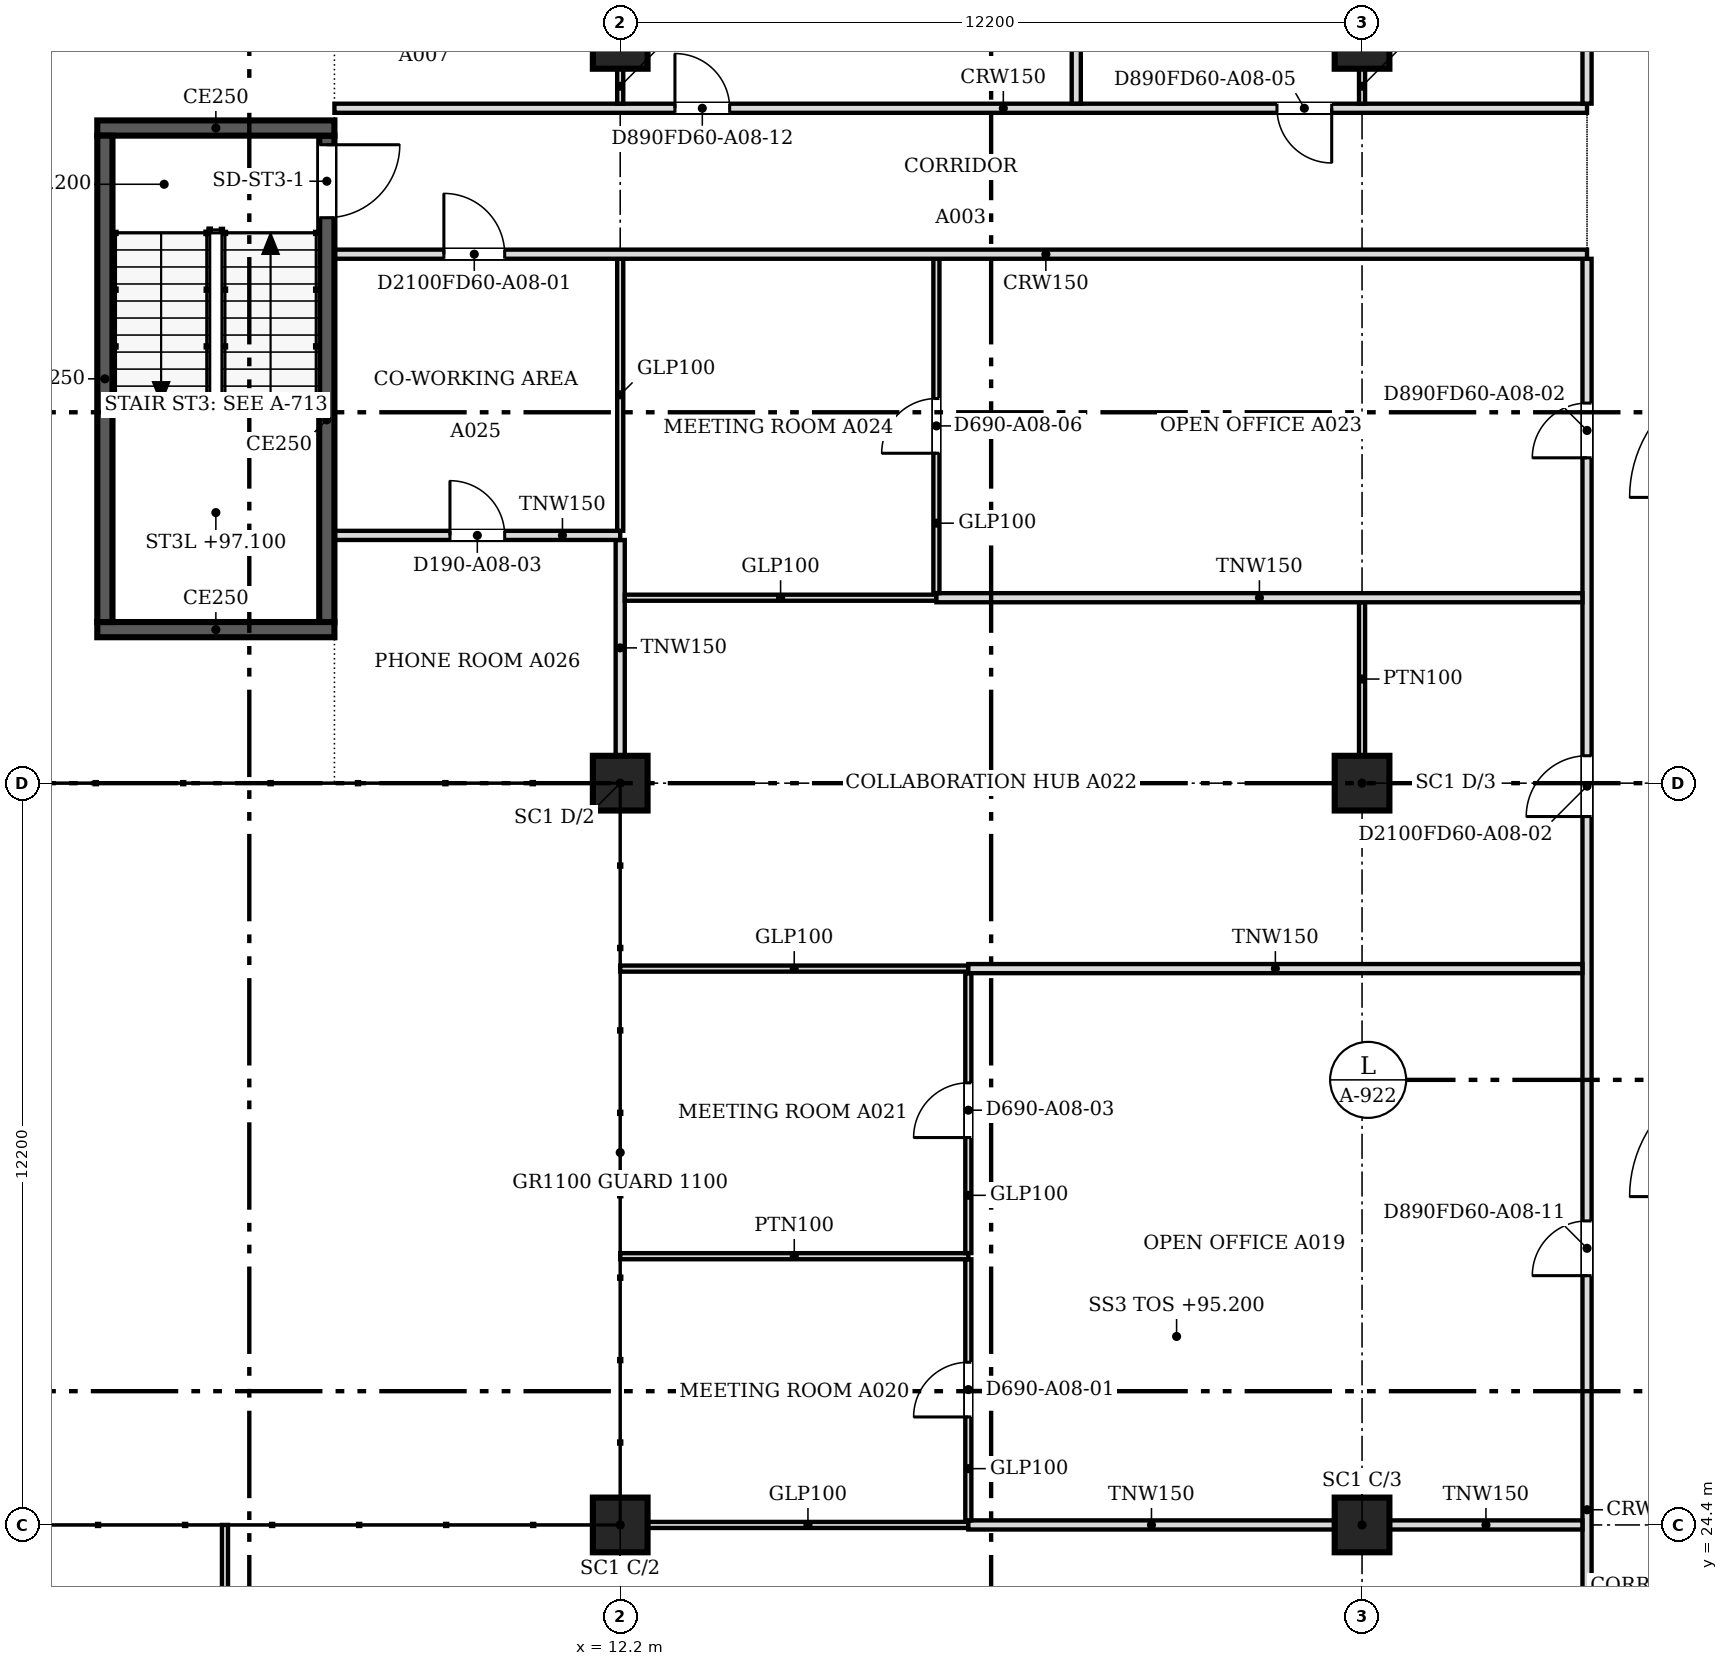
"""IFC4 building model, lengths in metres.
Left out: names, types, materials, properties, quantities, classifications, styles, units other than length and angle.
Written with IfcOpenShell. Run it as: python <this file> out.ifc"""

import sys

from ifc_helpers import new_model, si_unit, direction, frame, frame_2d, origin, origin_2d, place, context, subcontext, project, spatial, rectangle, extrude, source, transform, mapped, element, fill, save


model = new_model("IFC4")
c1 = context("Model", 3, precision=1e-05, world=origin(), true_north=direction((0.0, 1.0)))
c2 = subcontext(c1, "Body", "Model", "MODEL_VIEW")
j1 = project(units=[si_unit("LENGTHUNIT", "METRE"), si_unit("PLANEANGLEUNIT", "RADIAN")], contexts=[c1])
p1 = place(None, origin())
s1 = spatial("IfcSite", under=j1, at=p1, CompositionType="ELEMENT")
p2 = place(p1, origin())
s2 = spatial("IfcBuilding", under=s1, at=p2, CompositionType="ELEMENT")
p3 = place(p2, frame((0.0, 0.0, 95.2)))
s3 = spatial("IfcBuildingStorey", under=s2, at=p3, CompositionType="ELEMENT", Elevation=95.2)
for number, where, z_axis, x_axis in (
    (1, (12.2, 24.4, 0.0), (0.0, 0.0, 1.0), (1.0, 0.0, 0.0)),
    (2, (12.2, 36.6, 0.0), (0.0, 0.0, 1.0), (1.0, 0.0, 0.0)),
    (3, (12.2, 48.8, 0.0), (0.0, 0.0, 1.0), (1.0, 0.0, 0.0)),
    (4, (24.4, 24.4, 0.0), (0.0, 0.0, 1.0), (1.0, 0.0, 0.0)),
    (5, (24.4, 36.6, 0.0), (0.0, 0.0, 1.0), (1.0, 0.0, 0.0)),
    (6, (24.4, 48.8, 0.0), (0.0, 0.0, 1.0), (1.0, 0.0, 0.0)),
):
    element("IfcColumn", number, at=place(p3, frame(where, z_axis=z_axis, x_axis=x_axis)), inside=s3, PredefinedType="COLUMN", context=c2, shape_type="SweptSolid", body=[
        extrude(rectangle(XDim=0.9, YDim=0.9, at=origin_2d()), origin(), (0.0, 0.0, 1.0), 3.6),
    ])
p4 = place(p3, frame((7.5, 39.125, 0.0), z_axis=(0.0, 0.0, 1.0), x_axis=(-1.0, 0.0, 0.0)))
e7 = element("IfcWall", 7, at=p4, inside=s3, PredefinedType="SOLIDWALL", context=c2, shape_type="SweptSolid", body=[
    extrude(rectangle(XDim=3.9, YDim=0.25, at=frame_2d((1.95, 0.0))), origin(), (0.0, 0.0, 1.0), 3.8),
])
p5 = place(p3, frame((3.725, 39.25, 0.0), z_axis=(0.0, 0.0, 1.0), x_axis=(0.0, 1.0, 0.0)))
e8 = element("IfcWall", 8, at=p5, inside=s3, PredefinedType="SOLIDWALL", context=c2, shape_type="SweptSolid", body=[
    extrude(rectangle(XDim=8.0, YDim=0.25, at=frame_2d((4.0, 0.0))), origin(), (0.0, 0.0, 1.0), 3.8),
])
p6 = place(p3, frame((3.6, 47.375, 0.0), z_axis=(0.0, 0.0, 1.0), x_axis=(1.0, 0.0, 0.0)))
e9 = element("IfcWall", 9, at=p6, inside=s3, PredefinedType="SOLIDWALL", context=c2, shape_type="SweptSolid", body=[
    extrude(rectangle(XDim=3.9, YDim=0.25, at=frame_2d((1.95, 0.0))), origin(), (0.0, 0.0, 1.0), 3.8),
])
p7 = place(p3, frame((7.375, 47.25, 0.0), z_axis=(0.0, 0.0, 1.0), x_axis=(0.0, -1.0, 0.0)))
e10 = element("IfcWall", 10, at=p7, inside=s3, PredefinedType="SOLIDWALL", context=c2, shape_type="SweptSolid", body=[
    extrude(rectangle(XDim=8.0, YDim=0.25, at=frame_2d((4.0, 0.0))), origin(), (0.0, 0.0, 1.0), 3.8),
])
m1 = source(origin(), c2, "Body", "SweptSolid", [
    extrude(rectangle(XDim=1.2, YDim=2.1, at=frame_2d((0.6, 1.05))), frame((0.0, 0.135, 0.0), z_axis=(0.0, -1.0, 0.0), x_axis=(1.0, 0.0, 0.0)), (0.0, 0.0, 1.0), 0.27),
])
p8 = place(p7, frame((0.15, 0.0, 0.0)))
e11 = element("IfcOpeningElement", 11, at=p8, cuts=e10, PredefinedType="OPENING", context=c2, shape_type="MappedRepresentation", body=[
    mapped(m1, transform((0.0, 0.0, 0.0), scale=1.0)),
])
p9 = place(p3, frame((28.1, 18.8, 0.0), z_axis=(0.0, 0.0, 1.0), x_axis=(0.0, 1.0, 0.0)))
e12 = element("IfcWall", 12, at=p9, inside=s3, PredefinedType="PARTITIONING", context=c2, shape_type="SweptSolid", body=[
    extrude(rectangle(XDim=26.424, YDim=0.15, at=frame_2d((13.212, 0.0))), origin(), (0.0, 0.0, 1.0), 3.067),
])
m2 = source(origin(), c2, "Body", "SweptSolid", [
    extrude(rectangle(XDim=0.9, YDim=2.1, at=frame_2d((0.45, 1.05))), frame((0.0, 0.085, 0.0), z_axis=(0.0, -1.0, 0.0), x_axis=(1.0, 0.0, 0.0)), (0.0, 0.0, 1.0), 0.17),
])
p10 = place(p9, frame((1.1, 0.0, 0.0)))
e13 = element("IfcOpeningElement", 13, at=p10, cuts=e12, PredefinedType="OPENING", context=c2, shape_type="MappedRepresentation", body=[
    mapped(m2, transform((0.0, 0.0, 0.0), scale=1.0)),
])
p11 = place(p9, frame((23.151, 0.0, 0.0)))
e14 = element("IfcOpeningElement", 14, at=p11, cuts=e12, PredefinedType="OPENING", context=c2, shape_type="MappedRepresentation", body=[
    mapped(m2, transform((0.0, 0.0, 0.0), scale=1.0)),
])
m3 = source(origin(), c2, "Body", "SweptSolid", [
    extrude(rectangle(XDim=1.0, YDim=2.1, at=frame_2d((0.5, 1.05))), frame((0.0, 0.085, 0.0), z_axis=(0.0, -1.0, 0.0), x_axis=(1.0, 0.0, 0.0)), (0.0, 0.0, 1.0), 0.17),
])
p12 = place(p9, frame((17.251, 0.0, 0.0)))
e15 = element("IfcOpeningElement", 15, at=p12, cuts=e12, PredefinedType="OPENING", context=c2, shape_type="MappedRepresentation", body=[
    mapped(m3, transform((0.0, 0.0, 0.0), scale=1.0)),
])
p13 = place(p9, frame((9.7, 0.0, 0.0)))
e16 = element("IfcOpeningElement", 16, at=p13, cuts=e12, PredefinedType="OPENING", context=c2, shape_type="MappedRepresentation", body=[
    mapped(m2, transform((0.0, 0.0, 0.0), scale=1.0)),
])
p14 = place(p3, frame((5.7, 18.99, 0.0), z_axis=(0.0, 0.0, 1.0), x_axis=(0.0, 1.0, 0.0)))
e17 = element("IfcWall", 17, at=p14, inside=s3, PredefinedType="PARTITIONING", context=c2, shape_type="SweptSolid", body=[
    extrude(rectangle(XDim=5.41, YDim=0.1, at=frame_2d((2.705, 0.0))), origin(), (0.0, 0.0, 1.0), 3.067),
])
m4 = source(origin(), c2, "Body", "SweptSolid", [
    extrude(rectangle(XDim=0.9, YDim=2.1, at=frame_2d((0.45, 1.05))), frame((0.0, 0.06, 0.0), z_axis=(0.0, -1.0, 0.0), x_axis=(1.0, 0.0, 0.0)), (0.0, 0.0, 1.0), 0.12),
])
p15 = place(p14, frame((2.3, 0.0, 0.0)))
e18 = element("IfcOpeningElement", 18, at=p15, cuts=e17, PredefinedType="OPENING", context=c2, shape_type="MappedRepresentation", body=[
    mapped(m4, transform((0.0, 0.0, 0.0), scale=1.0)),
])
p16 = place(p3, frame((12.651, 24.4, 0.0), z_axis=(0.0, 0.0, 1.0), x_axis=(1.0, 0.0, 0.0)))
e19 = element("IfcWall", 19, at=p16, inside=s3, PredefinedType="PARTITIONING", context=c2, shape_type="SweptSolid", body=[
    extrude(rectangle(XDim=5.273, YDim=0.1, at=frame_2d((2.637, 0.0))), origin(), (0.0, 0.0, 1.0), 3.067),
])
p17 = place(p3, frame((17.925, 24.4, 0.0), z_axis=(0.0, 0.0, 1.0), x_axis=(1.0, 0.0, 0.0)))
e20 = element("IfcWall", 20, at=p17, inside=s3, PredefinedType="PARTITIONING", context=c2, shape_type="SweptSolid", body=[
    extrude(rectangle(XDim=6.024, YDim=0.15, at=frame_2d((3.012, 0.0))), origin(), (0.0, 0.0, 1.0), 3.067),
])
p18 = place(p3, frame((24.851, 24.4, 0.0), z_axis=(0.0, 0.0, 1.0), x_axis=(1.0, 0.0, 0.0)))
e21 = element("IfcWall", 21, at=p18, inside=s3, PredefinedType="PARTITIONING", context=c2, shape_type="SweptSolid", body=[
    extrude(rectangle(XDim=3.173, YDim=0.15, at=frame_2d((1.586, 0.0))), origin(), (0.0, 0.0, 1.0), 3.067),
])
p19 = place(p3, frame((17.925, 24.476, 0.0), z_axis=(0.0, 0.0, 1.0), x_axis=(0.0, 1.0, 0.0)))
e22 = element("IfcWall", 22, at=p19, inside=s3, PredefinedType="PARTITIONING", context=c2, shape_type="SweptSolid", body=[
    extrude(rectangle(XDim=4.293, YDim=0.1, at=frame_2d((2.146, 0.0))), origin(), (0.0, 0.0, 1.0), 3.067),
])
p20 = place(p19, frame((1.7, 0.0, 0.0)))
e23 = element("IfcOpeningElement", 23, at=p20, cuts=e22, PredefinedType="OPENING", context=c2, shape_type="MappedRepresentation", body=[
    mapped(m4, transform((0.0, 0.0, 0.0), scale=1.0)),
])
p21 = place(p3, frame((12.2, 28.82, 0.0), z_axis=(0.0, 0.0, 1.0), x_axis=(1.0, 0.0, 0.0)))
e24 = element("IfcWall", 24, at=p21, inside=s3, PredefinedType="PARTITIONING", context=c2, shape_type="SweptSolid", body=[
    extrude(rectangle(XDim=5.725, YDim=0.1, at=frame_2d((2.863, 0.0))), origin(), (0.0, 0.0, 1.0), 3.067),
])
p22 = place(p3, frame((17.925, 28.871, 0.0), z_axis=(0.0, 0.0, 1.0), x_axis=(0.0, 1.0, 0.0)))
e25 = element("IfcWall", 25, at=p22, inside=s3, PredefinedType="PARTITIONING", context=c2, shape_type="SweptSolid", body=[
    extrude(rectangle(XDim=4.603, YDim=0.1, at=frame_2d((2.301, 0.0))), origin(), (0.0, 0.0, 1.0), 3.067),
])
p23 = place(p22, frame((1.9, 0.0, 0.0)))
e26 = element("IfcOpeningElement", 26, at=p23, cuts=e25, PredefinedType="OPENING", context=c2, shape_type="MappedRepresentation", body=[
    mapped(m4, transform((0.0, 0.0, 0.0), scale=1.0)),
])
p24 = place(p3, frame((12.2, 33.55, 0.0), z_axis=(0.0, 0.0, 1.0), x_axis=(1.0, 0.0, 0.0)))
e27 = element("IfcWall", 27, at=p24, inside=s3, PredefinedType="PARTITIONING", context=c2, shape_type="SweptSolid", body=[
    extrude(rectangle(XDim=5.724, YDim=0.1, at=frame_2d((2.862, 0.0))), origin(), (0.0, 0.0, 1.0), 3.067),
])
p25 = place(p3, frame((17.925, 33.55, 0.0), z_axis=(0.0, 0.0, 1.0), x_axis=(1.0, 0.0, 0.0)))
e28 = element("IfcWall", 28, at=p25, inside=s3, PredefinedType="PARTITIONING", context=c2, shape_type="SweptSolid", body=[
    extrude(rectangle(XDim=10.099, YDim=0.15, at=frame_2d((5.049, 0.0))), origin(), (0.0, 0.0, 1.0), 3.067),
])
p26 = place(p3, frame((12.2, 37.051, 0.0), z_axis=(0.0, 0.0, 1.0), x_axis=(0.0, 1.0, 0.0)))
e29 = element("IfcWall", 29, at=p26, inside=s3, PredefinedType="PARTITIONING", context=c2, shape_type="SweptSolid", body=[
    extrude(rectangle(XDim=3.548, YDim=0.15, at=frame_2d((1.774, 0.0))), origin(), (0.0, 0.0, 1.0), 3.067),
])
p27 = place(p3, frame((24.4, 37.05, 0.0), z_axis=(0.0, 0.0, 1.0), x_axis=(0.0, 1.0, 0.0)))
e30 = element("IfcWall", 30, at=p27, inside=s3, PredefinedType="PARTITIONING", context=c2, shape_type="SweptSolid", body=[
    extrude(rectangle(XDim=2.525, YDim=0.1, at=frame_2d((1.262, 0.0))), origin(), (0.0, 0.0, 1.0), 3.067),
])
p28 = place(p3, frame((12.276, 39.65, 0.0), z_axis=(0.0, 0.0, 1.0), x_axis=(1.0, 0.0, 0.0)))
e31 = element("IfcWall", 31, at=p28, inside=s3, PredefinedType="PARTITIONING", context=c2, shape_type="SweptSolid", body=[
    extrude(rectangle(XDim=5.123, YDim=0.1, at=frame_2d((2.562, 0.0))), origin(), (0.0, 0.0, 1.0), 3.067),
])
p29 = place(p3, frame((17.4, 39.65, 0.0), z_axis=(0.0, 0.0, 1.0), x_axis=(1.0, 0.0, 0.0)))
e32 = element("IfcWall", 32, at=p29, inside=s3, PredefinedType="PARTITIONING", context=c2, shape_type="SweptSolid", body=[
    extrude(rectangle(XDim=10.624, YDim=0.15, at=frame_2d((5.312, 0.0))), origin(), (0.0, 0.0, 1.0), 3.067),
])
p30 = place(p3, frame((17.4, 39.726, 0.0), z_axis=(0.0, 0.0, 1.0), x_axis=(0.0, 1.0, 0.0)))
e33 = element("IfcWall", 33, at=p30, inside=s3, PredefinedType="PARTITIONING", context=c2, shape_type="SweptSolid", body=[
    extrude(rectangle(XDim=5.498, YDim=0.1, at=frame_2d((2.749, 0.0))), origin(), (0.0, 0.0, 1.0), 3.067),
])
p31 = place(p30, frame((2.3, 0.0, 0.0)))
e34 = element("IfcOpeningElement", 34, at=p31, cuts=e33, PredefinedType="OPENING", context=c2, shape_type="MappedRepresentation", body=[
    mapped(m4, transform((0.0, 0.0, 0.0), scale=1.0)),
])
p32 = place(p3, frame((12.2, 40.675, 0.0), z_axis=(0.0, 0.0, 1.0), x_axis=(-1.0, 0.0, 0.0)))
e35 = element("IfcWall", 35, at=p32, inside=s3, PredefinedType="PARTITIONING", context=c2, shape_type="SweptSolid", body=[
    extrude(rectangle(XDim=4.7, YDim=0.15, at=frame_2d((2.35, 0.0))), origin(), (0.0, 0.0, 1.0), 3.067),
])
p33 = place(p32, frame((1.9, 0.0, 0.0)))
e36 = element("IfcOpeningElement", 36, at=p33, cuts=e35, PredefinedType="OPENING", context=c2, shape_type="MappedRepresentation", body=[
    mapped(m2, transform((0.0, 0.0, 0.0), scale=1.0)),
])
p34 = place(p3, frame((12.2, 40.751, 0.0), z_axis=(0.0, 0.0, 1.0), x_axis=(0.0, 1.0, 0.0)))
e37 = element("IfcWall", 37, at=p34, inside=s3, PredefinedType="PARTITIONING", context=c2, shape_type="SweptSolid", body=[
    extrude(rectangle(XDim=4.473, YDim=0.1, at=frame_2d((2.237, 0.0))), origin(), (0.0, 0.0, 1.0), 3.067),
])
p35 = place(p3, frame((28.1, 45.3, 0.0), z_axis=(0.0, 0.0, 1.0), x_axis=(-1.0, 0.0, 0.0)))
e38 = element("IfcWall", 38, at=p35, inside=s3, PredefinedType="PARTITIONING", context=c2, shape_type="SweptSolid", body=[
    extrude(rectangle(XDim=20.6, YDim=0.15, at=frame_2d((10.3, 0.0))), origin(), (0.0, 0.0, 1.0), 3.067),
])
p36 = place(p35, frame((17.8, 0.0, 0.0)))
e39 = element("IfcOpeningElement", 39, at=p36, cuts=e38, PredefinedType="OPENING", context=c2, shape_type="MappedRepresentation", body=[
    mapped(m3, transform((0.0, 0.0, 0.0), scale=1.0)),
])
p37 = place(p3, frame((7.5, 47.7, 0.0), z_axis=(0.0, 0.0, 1.0), x_axis=(1.0, 0.0, 0.0)))
e40 = element("IfcWall", 40, at=p37, inside=s3, PredefinedType="PARTITIONING", context=c2, shape_type="SweptSolid", body=[
    extrude(rectangle(XDim=20.6, YDim=0.15, at=frame_2d((10.3, 0.0))), origin(), (0.0, 0.0, 1.0), 3.067),
])
p38 = place(p37, frame((15.501, 0.0, 0.0)))
e41 = element("IfcOpeningElement", 41, at=p38, cuts=e40, PredefinedType="OPENING", context=c2, shape_type="MappedRepresentation", body=[
    mapped(m2, transform((0.0, 0.0, 0.0), scale=1.0)),
])
p39 = place(p37, frame((5.6, 0.0, 0.0)))
e42 = element("IfcOpeningElement", 42, at=p39, cuts=e40, PredefinedType="OPENING", context=c2, shape_type="MappedRepresentation", body=[
    mapped(m2, transform((0.0, 0.0, 0.0), scale=1.0)),
])
p40 = place(p3, frame((19.7, 47.776, 0.0), z_axis=(0.0, 0.0, 1.0), x_axis=(0.0, 1.0, 0.0)))
e43 = element("IfcWall", 43, at=p40, inside=s3, PredefinedType="PARTITIONING", context=c2, shape_type="SweptSolid", body=[
    extrude(rectangle(XDim=2.874, YDim=0.15, at=frame_2d((1.437, 0.0))), origin(), (0.0, 0.0, 1.0), 3.067),
])
p41 = place(p3, frame((28.1, 47.776, 0.0), z_axis=(0.0, 0.0, 1.0), x_axis=(0.0, 1.0, 0.0)))
e44 = element("IfcWall", 44, at=p41, inside=s3, PredefinedType="PARTITIONING", context=c2, shape_type="SweptSolid", body=[
    extrude(rectangle(XDim=3.324, YDim=0.15, at=frame_2d((1.662, 0.0))), origin(), (0.0, 0.0, 1.0), 3.067),
])
for number, where, z_axis, x_axis in (
    (45, (12.2, 48.35, 0.0), (0.0, 0.0, 1.0), (0.0, -1.0, 0.0)),
    (46, (24.4, 48.35, 0.0), (0.0, 0.0, 1.0), (0.0, -1.0, 0.0)),
):
    element("IfcWall", number, at=place(p3, frame(where, z_axis=z_axis, x_axis=x_axis)), inside=s3, PredefinedType="PARTITIONING", context=c2, shape_type="SweptSolid", body=[
        extrude(rectangle(XDim=0.575, YDim=0.1, at=frame_2d((0.288, 0.0))), origin(), (0.0, 0.0, 1.0), 3.067),
    ])
m5 = source(origin(), c2, "Body", "SweptSolid", [
    extrude(rectangle(XDim=1.2, YDim=2.1, at=frame_2d((0.6, 1.05))), frame((0.0, 0.025, 0.0), z_axis=(0.0, -1.0, 0.0), x_axis=(1.0, 0.0, 0.0)), (0.0, 0.0, 1.0), 0.05),
])
p42 = place(p8, origin())
e47 = element("IfcDoor", 47, at=p42, inside=s3, OperationType="SINGLE_SWING_LEFT", PredefinedType="DOOR", context=c2, shape_type="MappedRepresentation", body=[
    mapped(m5, transform((0.0, 0.0, 0.0), scale=1.0)),
])
fill(e11, e47)
m6 = source(origin(), c2, "Body", "SweptSolid", [
    extrude(rectangle(XDim=0.9, YDim=2.1, at=frame_2d((0.45, 1.05))), frame((0.0, 0.025, 0.0), z_axis=(0.0, -1.0, 0.0), x_axis=(1.0, 0.0, 0.0)), (0.0, 0.0, 1.0), 0.05),
])
p43 = place(p20, origin())
e48 = element("IfcDoor", 48, at=p43, inside=s3, OperationType="SINGLE_SWING_LEFT", PredefinedType="DOOR", context=c2, shape_type="MappedRepresentation", body=[
    mapped(m6, transform((0.0, 0.0, 0.0), scale=1.0)),
])
fill(e23, e48)
p44 = place(p23, origin())
e49 = element("IfcDoor", 49, at=p44, inside=s3, OperationType="SINGLE_SWING_LEFT", PredefinedType="DOOR", context=c2, shape_type="MappedRepresentation", body=[
    mapped(m6, transform((0.0, 0.0, 0.0), scale=1.0)),
])
fill(e26, e49)
m7 = source(origin(), c2, "Body", "SweptSolid", [
    extrude(rectangle(XDim=1.0, YDim=2.1, at=frame_2d((0.5, 1.05))), frame((0.0, 0.025, 0.0), z_axis=(0.0, -1.0, 0.0), x_axis=(1.0, 0.0, 0.0)), (0.0, 0.0, 1.0), 0.05),
])
p45 = place(p36, origin())
e50 = element("IfcDoor", 50, at=p45, inside=s3, OperationType="SINGLE_SWING_RIGHT", PredefinedType="DOOR", context=c2, shape_type="MappedRepresentation", body=[
    mapped(m7, transform((0.0, 0.0, 0.0), scale=1.0)),
])
fill(e39, e50)
p46 = place(p33, origin())
e51 = element("IfcDoor", 51, at=p46, inside=s3, OperationType="SINGLE_SWING_RIGHT", PredefinedType="DOOR", context=c2, shape_type="MappedRepresentation", body=[
    mapped(m6, transform((0.0, 0.0, 0.0), scale=1.0)),
])
fill(e36, e51)
p47 = place(p31, origin())
e52 = element("IfcDoor", 52, at=p47, inside=s3, OperationType="SINGLE_SWING_LEFT", PredefinedType="DOOR", context=c2, shape_type="MappedRepresentation", body=[
    mapped(m6, transform((0.0, 0.0, 0.0), scale=1.0)),
])
fill(e34, e52)
p48 = place(p11, origin())
e53 = element("IfcDoor", 53, at=p48, inside=s3, OperationType="SINGLE_SWING_LEFT", PredefinedType="DOOR", context=c2, shape_type="MappedRepresentation", body=[
    mapped(m6, transform((0.0, 0.0, 0.0), scale=1.0)),
])
fill(e14, e53)
p49 = place(p12, origin())
e54 = element("IfcDoor", 54, at=p49, inside=s3, OperationType="SINGLE_SWING_LEFT", PredefinedType="DOOR", context=c2, shape_type="MappedRepresentation", body=[
    mapped(m7, transform((0.0, 0.0, 0.0), scale=1.0)),
])
fill(e15, e54)
p50 = place(p38, origin())
e55 = element("IfcDoor", 55, at=p50, inside=s3, OperationType="SINGLE_SWING_RIGHT", PredefinedType="DOOR", context=c2, shape_type="MappedRepresentation", body=[
    mapped(m6, transform((0.0, 0.0, 0.0), scale=1.0)),
])
fill(e41, e55)
p51 = place(p13, origin())
e56 = element("IfcDoor", 56, at=p51, inside=s3, OperationType="SINGLE_SWING_LEFT", PredefinedType="DOOR", context=c2, shape_type="MappedRepresentation", body=[
    mapped(m6, transform((0.0, 0.0, 0.0), scale=1.0)),
])
fill(e16, e56)
p52 = place(p39, origin())
e57 = element("IfcDoor", 57, at=p52, inside=s3, OperationType="SINGLE_SWING_LEFT", PredefinedType="DOOR", context=c2, shape_type="MappedRepresentation", body=[
    mapped(m6, transform((0.0, 0.0, 0.0), scale=1.0)),
])
fill(e42, e57)
save(model, sys.argv[1])
